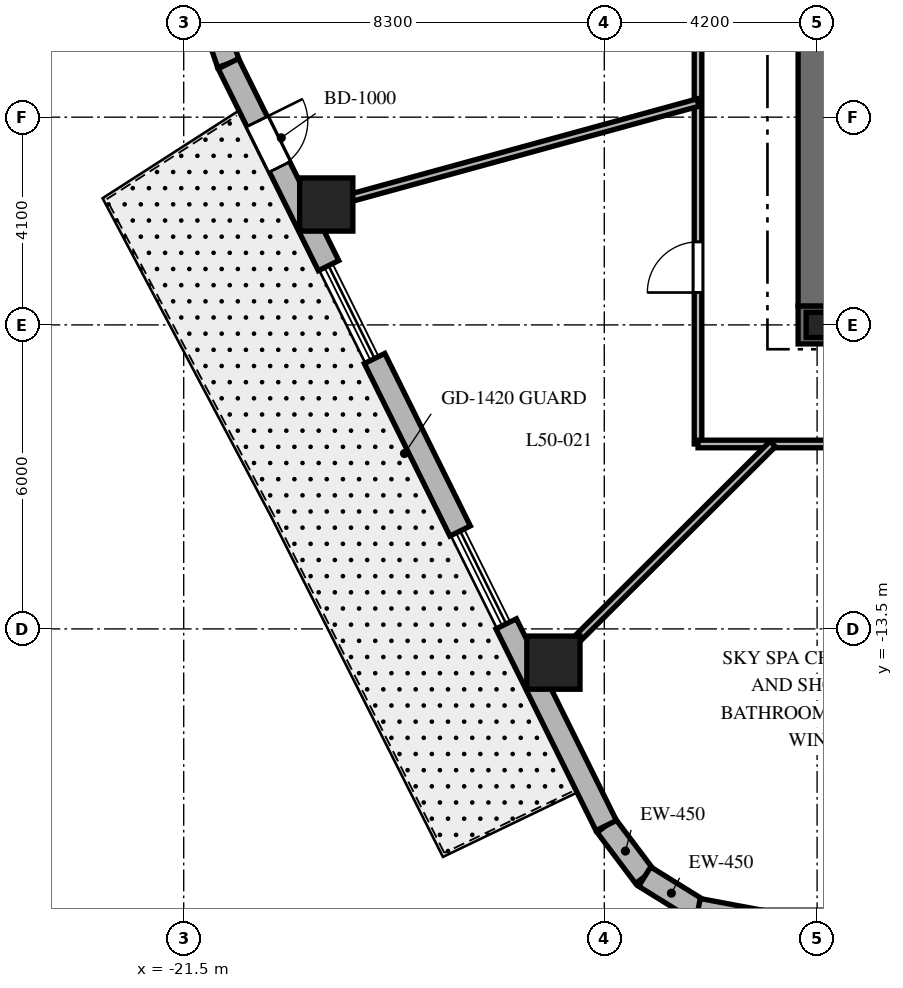
"""IFC4 building model, lengths in metres.
Left out: names, types, materials, properties, quantities, classifications, styles, units other than length and angle.
Written with IfcOpenShell. Run it as: python <this file> out.ifc"""

import sys

from ifc_helpers import new_model, si_unit, direction, frame, frame_2d, origin, origin_2d, place, context, subcontext, project, spatial, rectangle, i_section, extrude, element, fill, save


model = new_model("IFC4")
c1 = context("Model", 3, precision=1e-05, world=origin(), true_north=direction((0.0, 1.0)))
c2 = subcontext(c1, "Body", "Model", "MODEL_VIEW")
j1 = project(units=[si_unit("LENGTHUNIT", "METRE"), si_unit("PLANEANGLEUNIT", "RADIAN")], contexts=[c1])
p1 = place(None, origin())
s1 = spatial("IfcSite", under=j1, at=p1, CompositionType="ELEMENT")
p2 = place(p1, origin())
s2 = spatial("IfcBuilding", under=s1, at=p2, CompositionType="ELEMENT")
p3 = place(p2, frame((0.0, 0.0, 201.5)))
s3 = spatial("IfcBuildingStorey", under=s2, at=p3, CompositionType="ELEMENT", Elevation=201.5)
p4 = place(p3, frame((-9.375, -7.5, 0.0), z_axis=(0.0, 0.0, 1.0), x_axis=(1.0, 0.0, 0.0)))
e1 = element("IfcWall", 1, at=p4, inside=s3, PredefinedType="SHEAR", context=c2, shape_type="SweptSolid", body=[
    extrude(rectangle(XDim=18.75, YDim=0.75, at=frame_2d((9.375, 0.0))), origin(), (0.0, 0.0, 1.0), 5.0),
])
p5 = place(p4, frame((9.425, 0.0, 0.0)))
e2 = element("IfcOpeningElement", 2, at=p5, cuts=e1, PredefinedType="OPENING", context=c2, shape_type="SweptSolid", body=[
    extrude(rectangle(XDim=1.0, YDim=2.15, at=frame_2d((0.5, 1.075))), frame((0.0, 0.385, 0.0), z_axis=(0.0, -1.0, 0.0), x_axis=(1.0, 0.0, 0.0)), (0.0, 0.0, 1.0), 0.77),
])
p6 = place(p3, frame((-9.0, -7.125, 0.0), z_axis=(0.0, 0.0, 1.0), x_axis=(0.0, 1.0, 0.0)))
e3 = element("IfcWall", 3, at=p6, inside=s3, PredefinedType="SHEAR", context=c2, shape_type="SweptSolid", body=[
    extrude(rectangle(XDim=14.25, YDim=0.75, at=frame_2d((7.125, 0.0))), origin(), (0.0, 0.0, 1.0), 5.0),
])
p7 = place(p6, frame((10.25, 0.0, 0.0)))
e4 = element("IfcOpeningElement", 4, at=p7, cuts=e3, PredefinedType="OPENING", context=c2, shape_type="SweptSolid", body=[
    extrude(rectangle(XDim=1.05, YDim=2.15, at=frame_2d((0.525, 1.075))), frame((0.0, 0.385, 0.0), z_axis=(0.0, -1.0, 0.0), x_axis=(1.0, 0.0, 0.0)), (0.0, 0.0, 1.0), 0.77),
])
p8 = place(p3, frame((-9.0, -7.5, 0.0), z_axis=(0.0, 0.0, 1.0), x_axis=(1.0, 0.0, 0.0)))
e5 = element("IfcColumn", 5, at=p8, inside=s3, PredefinedType="COLUMN", context=c2, shape_type="SweptSolid", body=[
    extrude(i_section(OverallWidth=0.432, OverallDepth=0.498, WebThickness=0.056, FlangeThickness=0.089, at=origin_2d()), origin(), (0.0, 0.0, 1.0), 5.0),
])
for number, where, z_axis, x_axis in (
    (6, (-18.687, -5.124, 0.0), (0.0, 0.0, 1.0), (1.0, 0.0, 0.0)),
    (7, (-14.204, -14.166, 0.0), (0.0, 0.0, 1.0), (1.0, 0.0, 0.0)),
):
    element("IfcColumn", number, at=place(p3, frame(where, z_axis=z_axis, x_axis=x_axis)), inside=s3, PredefinedType="COLUMN", context=c2, shape_type="SweptSolid", body=[
        extrude(rectangle(XDim=1.05, YDim=1.05, at=origin_2d()), origin(), (0.0, 0.0, 1.0), 5.0),
    ])
p9 = place(p3, frame((-13.162, -17.381, 0.0), z_axis=(0.0, 0.0, 1.0), x_axis=(0.601515770517, -0.798860925205, 0.0)))
e8 = element("IfcWall", 8, at=p9, inside=s3, PredefinedType="SOLIDWALL", context=c2, shape_type="SweptSolid", body=[
    extrude(rectangle(XDim=1.262, YDim=0.45, at=frame_2d((0.631, 0.0))), origin(), (0.0, 0.0, 1.0), 4.7),
])
p10 = place(p3, frame((-12.403, -18.389, 0.0), z_axis=(0.0, 0.0, 1.0), x_axis=(0.849795170926, -0.527113049991, 0.0)))
e9 = element("IfcWall", 9, at=p10, inside=s3, PredefinedType="SOLIDWALL", context=c2, shape_type="SweptSolid", body=[
    extrude(rectangle(XDim=1.241, YDim=0.45, at=frame_2d((0.62, 0.0))), origin(), (0.0, 0.0, 1.0), 4.7),
])
p11 = place(p3, frame((-11.349, -19.043, 0.0), z_axis=(0.0, 0.0, 1.0), x_axis=(0.982931267051, -0.183973161772, 0.0)))
e10 = element("IfcWall", 10, at=p11, inside=s3, PredefinedType="SOLIDWALL", context=c2, shape_type="SweptSolid", body=[
    extrude(rectangle(XDim=1.262, YDim=0.45, at=frame_2d((0.631, 0.0))), origin(), (0.0, 0.0, 1.0), 4.7),
])
p12 = place(p3, frame((-20.911, -1.484, 0.0), z_axis=(0.0, 0.0, 1.0), x_axis=(0.321623334353, -0.946867694453, 0.0)))
e11 = element("IfcWall", 11, at=p12, inside=s3, PredefinedType="SOLIDWALL", context=c2, shape_type="SweptSolid", body=[
    extrude(rectangle(XDim=0.909, YDim=0.45, at=frame_2d((0.454, 0.0))), origin(), (0.0, 0.0, 1.0), 4.7),
])
p13 = place(p3, frame((-20.618, -2.344, 0.0), z_axis=(0.0, 0.0, 1.0), x_axis=(0.444248024627, -0.895903841166, 0.0)))
e12 = element("IfcWall", 12, at=p13, inside=s3, PredefinedType="SOLIDWALL", context=c2, shape_type="SweptSolid", body=[
    extrude(rectangle(XDim=4.449, YDim=0.45, at=frame_2d((2.225, 0.0))), origin(), (0.0, 0.0, 1.0), 4.7),
])
p14 = place(p13, frame((1.275, 0.0, 0.0)))
e13 = element("IfcOpeningElement", 13, at=p14, cuts=e12, PredefinedType="OPENING", context=c2, shape_type="SweptSolid", body=[
    extrude(rectangle(XDim=1.0, YDim=2.15, at=frame_2d((0.5, 1.075))), frame((0.0, 0.235, 0.0), z_axis=(0.0, -1.0, 0.0), x_axis=(1.0, 0.0, 0.0)), (0.0, 0.0, 1.0), 0.47),
])
p15 = place(p3, frame((-17.733, -8.163, 0.0), z_axis=(0.0, 0.0, 1.0), x_axis=(0.444229875213, -0.895912840609, 0.0)))
e14 = element("IfcWall", 14, at=p15, inside=s3, PredefinedType="SOLIDWALL", context=c2, shape_type="SweptSolid", body=[
    extrude(rectangle(XDim=3.8, YDim=0.45, at=frame_2d((1.9, 0.0))), origin(), (0.0, 0.0, 1.0), 4.7),
])
p16 = place(p3, frame((-15.136, -13.4, 0.0), z_axis=(0.0, 0.0, 1.0), x_axis=(0.444243648127, -0.895906011308, 0.0)))
e15 = element("IfcWall", 15, at=p16, inside=s3, PredefinedType="SOLIDWALL", context=c2, shape_type="SweptSolid", body=[
    extrude(rectangle(XDim=4.443, YDim=0.45, at=frame_2d((2.221, 0.0))), origin(), (0.0, 0.0, 1.0), 4.7),
])
p17 = place(p3, frame((-11.35, -9.85, 0.0), z_axis=(0.0, 0.0, 1.0), x_axis=(0.0, 1.0, 0.0)))
e16 = element("IfcWall", 16, at=p17, inside=s3, PredefinedType="PARTITIONING", context=c2, shape_type="SweptSolid", body=[
    extrude(rectangle(XDim=19.7, YDim=0.15, at=frame_2d((9.85, 0.0))), origin(), (0.0, 0.0, 1.0), 2.89),
])
p18 = place(p17, frame((15.183, 0.0, 0.0)))
e17 = element("IfcOpeningElement", 17, at=p18, cuts=e16, PredefinedType="OPENING", context=c2, shape_type="SweptSolid", body=[
    extrude(rectangle(XDim=1.0, YDim=2.03, at=frame_2d((0.5, 1.015))), frame((0.0, 0.085, 0.0), z_axis=(0.0, -1.0, 0.0), x_axis=(1.0, 0.0, 0.0)), (0.0, 0.0, 1.0), 0.17),
])
p19 = place(p17, frame((8.819, 0.0, 0.0)))
e18 = element("IfcOpeningElement", 18, at=p19, cuts=e16, PredefinedType="OPENING", context=c2, shape_type="SweptSolid", body=[
    extrude(rectangle(XDim=1.0, YDim=2.03, at=frame_2d((0.5, 1.015))), frame((0.0, 0.085, 0.0), z_axis=(0.0, -1.0, 0.0), x_axis=(1.0, 0.0, 0.0)), (0.0, 0.0, 1.0), 0.17),
])
p20 = place(p17, frame((2.989, 0.0, 0.0)))
e19 = element("IfcOpeningElement", 19, at=p20, cuts=e16, PredefinedType="OPENING", context=c2, shape_type="SweptSolid", body=[
    extrude(rectangle(XDim=1.0, YDim=2.03, at=frame_2d((0.5, 1.015))), frame((0.0, 0.085, 0.0), z_axis=(0.0, -1.0, 0.0), x_axis=(1.0, 0.0, 0.0)), (0.0, 0.0, 1.0), 0.17),
])
p21 = place(p3, frame((11.35, -9.85, 0.0), z_axis=(0.0, 0.0, 1.0), x_axis=(-1.0, 0.0, 0.0)))
e20 = element("IfcWall", 20, at=p21, inside=s3, PredefinedType="PARTITIONING", context=c2, shape_type="SweptSolid", body=[
    extrude(rectangle(XDim=22.7, YDim=0.15, at=frame_2d((11.35, 0.0))), origin(), (0.0, 0.0, 1.0), 2.89),
])
p22 = place(p21, frame((17.347, 0.0, 0.0)))
e21 = element("IfcOpeningElement", 21, at=p22, cuts=e20, PredefinedType="OPENING", context=c2, shape_type="SweptSolid", body=[
    extrude(rectangle(XDim=1.0, YDim=2.03, at=frame_2d((0.5, 1.015))), frame((0.0, 0.085, 0.0), z_axis=(0.0, -1.0, 0.0), x_axis=(1.0, 0.0, 0.0)), (0.0, 0.0, 1.0), 0.17),
])
p23 = place(p21, frame((10.423, 0.0, 0.0)))
e22 = element("IfcOpeningElement", 22, at=p23, cuts=e20, PredefinedType="OPENING", context=c2, shape_type="SweptSolid", body=[
    extrude(rectangle(XDim=1.0, YDim=2.03, at=frame_2d((0.5, 1.015))), frame((0.0, 0.085, 0.0), z_axis=(0.0, -1.0, 0.0), x_axis=(1.0, 0.0, 0.0)), (0.0, 0.0, 1.0), 0.17),
])
p24 = place(p21, frame((3.362, 0.0, 0.0)))
e23 = element("IfcOpeningElement", 23, at=p24, cuts=e20, PredefinedType="OPENING", context=c2, shape_type="SweptSolid", body=[
    extrude(rectangle(XDim=1.0, YDim=2.03, at=frame_2d((0.5, 1.015))), frame((0.0, 0.085, 0.0), z_axis=(0.0, -1.0, 0.0), x_axis=(1.0, 0.0, 0.0)), (0.0, 0.0, 1.0), 0.17),
])
p25 = place(p3, frame((-11.35, -3.112, 0.0), z_axis=(0.0, 0.0, 1.0), x_axis=(-0.964400374182, -0.264446437445, 0.0)))
e24 = element("IfcWall", 24, at=p25, inside=s3, PredefinedType="PARTITIONING", context=c2, shape_type="SweptSolid", body=[
    extrude(rectangle(XDim=8.112, YDim=0.15, at=frame_2d((4.056, 0.0))), origin(), (0.0, 0.0, 1.0), 2.89),
])
p26 = place(p3, frame((-9.876, -9.85, 0.0), z_axis=(0.0, 0.0, 1.0), x_axis=(-0.708044623933, -0.706167692917, 0.0)))
e25 = element("IfcWall", 25, at=p26, inside=s3, PredefinedType="PARTITIONING", context=c2, shape_type="SweptSolid", body=[
    extrude(rectangle(XDim=6.634, YDim=0.15, at=frame_2d((3.317, 0.0))), origin(), (0.0, 0.0, 1.0), 2.89),
])
p27 = place(p14, origin())
e26 = element("IfcDoor", 26, at=p27, inside=s3, OperationType="SINGLE_SWING_LEFT", PredefinedType="DOOR", context=c2, shape_type="SweptSolid", body=[
    extrude(rectangle(XDim=1.0, YDim=2.15, at=frame_2d((0.5, 1.075))), frame((0.0, 0.025, 0.0), z_axis=(0.0, -1.0, 0.0), x_axis=(1.0, 0.0, 0.0)), (0.0, 0.0, 1.0), 0.05),
])
fill(e13, e26)
p28 = place(p20, origin())
e27 = element("IfcDoor", 27, at=p28, inside=s3, OperationType="SINGLE_SWING_LEFT", PredefinedType="DOOR", context=c2, shape_type="SweptSolid", body=[
    extrude(rectangle(XDim=1.0, YDim=2.03, at=frame_2d((0.5, 1.015))), frame((0.0, 0.025, 0.0), z_axis=(0.0, -1.0, 0.0), x_axis=(1.0, 0.0, 0.0)), (0.0, 0.0, 1.0), 0.05),
])
fill(e19, e27)
save(model, sys.argv[1])
